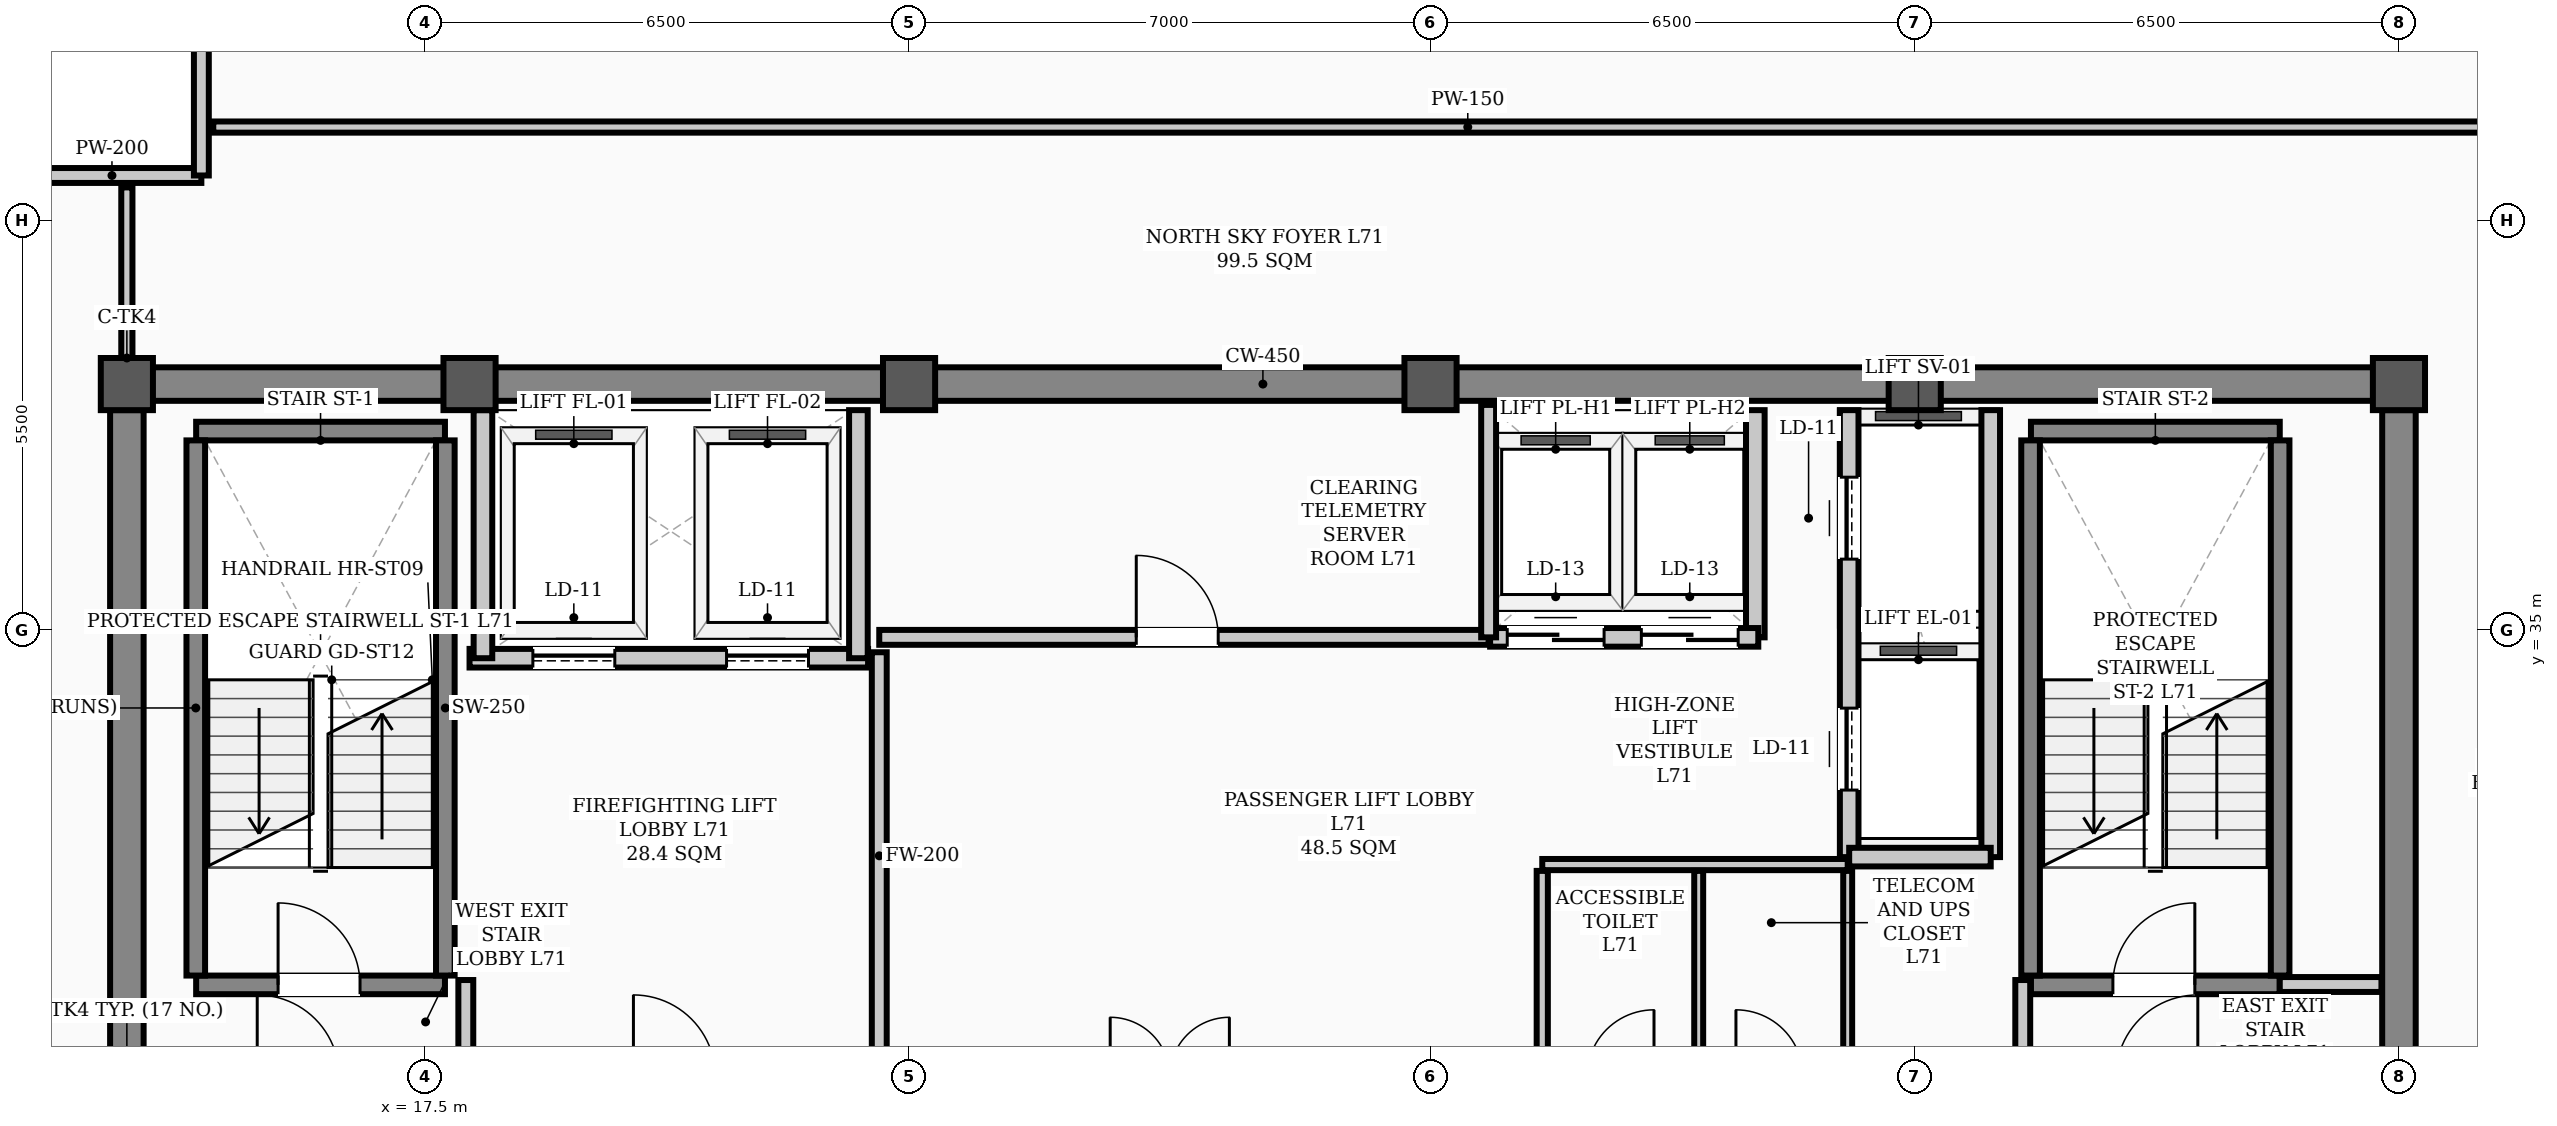
"""IFC4 building model, lengths in metres.
Left out: names, types, materials, properties, quantities, classifications, styles, units other than length and angle.
Written with IfcOpenShell. Run it as: python <this file> out.ifc"""

import sys

from ifc_helpers import new_model, si_unit, direction, frame, frame_2d, origin, origin_2d, place, context, subcontext, project, spatial, rectangle, hollow_rectangle, extrude, element, fill, save


model = new_model("IFC4")
c1 = context("Model", 3, precision=1e-05, world=origin(), true_north=direction((0.0, 1.0)))
c2 = subcontext(c1, "Body", "Model", "MODEL_VIEW")
j1 = project(units=[si_unit("LENGTHUNIT", "METRE"), si_unit("PLANEANGLEUNIT", "RADIAN")], contexts=[c1])
p1 = place(None, origin())
s1 = spatial("IfcSite", under=j1, at=p1, CompositionType="ELEMENT")
p2 = place(p1, origin())
s2 = spatial("IfcBuilding", under=s1, at=p2, CompositionType="ELEMENT")
p3 = place(p2, frame((0.0, 0.0, 285.2)))
s3 = spatial("IfcBuildingStorey", under=s2, at=p3, CompositionType="ELEMENT", Elevation=285.2)
for number, where, z_axis, x_axis in (
    (1, (13.5, 38.3, 0.0), (0.0, 0.0, 1.0), (1.0, 0.0, 0.0)),
    (2, (18.1, 38.3, 0.0), (0.0, 0.0, 1.0), (1.0, 0.0, 0.0)),
    (3, (24.0, 38.3, 0.0), (0.0, 0.0, 1.0), (1.0, 0.0, 0.0)),
    (4, (31.0, 38.3, 0.0), (0.0, 0.0, 1.0), (1.0, 0.0, 0.0)),
    (5, (37.5, 38.3, 0.0), (0.0, 0.0, 1.0), (1.0, 0.0, 0.0)),
    (6, (44.0, 38.3, 0.0), (0.0, 0.0, 1.0), (1.0, 0.0, 0.0)),
):
    element("IfcColumn", number, at=place(p3, frame(where, z_axis=z_axis, x_axis=x_axis)), inside=s3, PredefinedType="COLUMN", context=c2, shape_type="SweptSolid", body=[
        extrude(hollow_rectangle(XDim=0.7, YDim=0.7, WallThickness=0.028, InnerFilletRadius=0.014, OuterFilletRadius=0.042, at=origin_2d()), origin(), (0.0, 0.0, 1.0), 3.9),
    ])
for number, where, z_axis, x_axis in (
    (7, (12.1, 41.1, 0.0), (0.0, 0.0, 1.0), (1.0, 0.0, 0.0)),
    (8, (14.5, 41.1, 0.0), (0.0, 0.0, 1.0), (0.0, 1.0, 0.0)),
):
    element("IfcWall", number, at=place(p3, frame(where, z_axis=z_axis, x_axis=x_axis)), inside=s3, PredefinedType="PARAPET", context=c2, shape_type="SweptSolid", body=[
        extrude(rectangle(XDim=2.4, YDim=0.2, at=frame_2d((1.2, 0.0))), origin(), (0.0, 0.0, 1.0), 1.2),
    ])
p4 = place(p3, frame((13.5, 38.3, 0.0), z_axis=(0.0, 0.0, 1.0), x_axis=(1.0, 0.0, 0.0)))
e9 = element("IfcWall", 9, at=p4, inside=s3, PredefinedType="SHEAR", context=c2, shape_type="SweptSolid", body=[
    extrude(rectangle(XDim=30.5, YDim=0.45, at=frame_2d((15.25, 0.0))), origin(), (0.0, 0.0, 1.0), 3.72),
])
for number, where, z_axis, x_axis in (
    (10, (13.5, 29.35, 0.0), (0.0, 0.0, 1.0), (0.0, 1.0, 0.0)),
    (11, (44.0, 29.35, 0.0), (0.0, 0.0, 1.0), (0.0, 1.0, 0.0)),
):
    element("IfcWall", number, at=place(p3, frame(where, z_axis=z_axis, x_axis=x_axis)), inside=s3, PredefinedType="SHEAR", context=c2, shape_type="SweptSolid", body=[
        extrude(rectangle(XDim=8.6, YDim=0.45, at=frame_2d((4.3, 0.0))), origin(), (0.0, 0.0, 1.0), 3.72),
    ])
p5 = place(p3, frame((14.43, 30.235, 0.0), z_axis=(0.0, 0.0, 1.0), x_axis=(1.0, 0.0, 0.0)))
e12 = element("IfcWall", 12, at=p5, inside=s3, PredefinedType="STANDARD", context=c2, shape_type="SweptSolid", body=[
    extrude(rectangle(XDim=3.34, YDim=0.25, at=frame_2d((1.67, 0.0))), origin(), (0.0, 0.0, 1.0), 3.72),
])
p6 = place(p5, frame((1.1, 0.0, 0.0)))
e13 = element("IfcOpeningElement", 13, at=p6, cuts=e12, PredefinedType="OPENING", context=c2, shape_type="SweptSolid", body=[
    extrude(rectangle(XDim=1.1, YDim=2.08, at=frame_2d((0.55, 1.04))), frame((0.0, 0.135, 0.0), z_axis=(0.0, -1.0, 0.0), x_axis=(1.0, 0.0, 0.0)), (0.0, 0.0, 1.0), 0.27),
])
p7 = place(p3, frame((14.43, 37.669, 0.0), z_axis=(0.0, 0.0, 1.0), x_axis=(1.0, 0.0, 0.0)))
e14 = element("IfcWall", 14, at=p7, inside=s3, PredefinedType="STANDARD", context=c2, shape_type="SweptSolid", body=[
    extrude(rectangle(XDim=3.34, YDim=0.25, at=frame_2d((1.67, 0.0))), origin(), (0.0, 0.0, 1.0), 3.72),
])
for number, where, z_axis, x_axis in (
    (15, (14.425, 30.36, 0.0), (0.0, 0.0, 1.0), (0.0, 1.0, 0.0)),
    (16, (17.775, 30.36, 0.0), (0.0, 0.0, 1.0), (0.0, 1.0, 0.0)),
):
    element("IfcWall", number, at=place(p3, frame(where, z_axis=z_axis, x_axis=x_axis)), inside=s3, PredefinedType="STANDARD", context=c2, shape_type="SweptSolid", body=[
        extrude(rectangle(XDim=7.184, YDim=0.25, at=frame_2d((3.592, 0.0))), origin(), (0.0, 0.0, 1.0), 3.72),
    ])
p8 = place(p3, frame((39.06, 30.235, 0.0), z_axis=(0.0, 0.0, 1.0), x_axis=(1.0, 0.0, 0.0)))
e17 = element("IfcWall", 17, at=p8, inside=s3, PredefinedType="STANDARD", context=c2, shape_type="SweptSolid", body=[
    extrude(rectangle(XDim=3.34, YDim=0.25, at=frame_2d((1.67, 0.0))), origin(), (0.0, 0.0, 1.0), 3.72),
])
p9 = place(p8, frame((1.1, 0.0, 0.0)))
e18 = element("IfcOpeningElement", 18, at=p9, cuts=e17, PredefinedType="OPENING", context=c2, shape_type="SweptSolid", body=[
    extrude(rectangle(XDim=1.1, YDim=2.08, at=frame_2d((0.55, 1.04))), frame((0.0, 0.135, 0.0), z_axis=(0.0, -1.0, 0.0), x_axis=(1.0, 0.0, 0.0)), (0.0, 0.0, 1.0), 0.27),
])
p10 = place(p3, frame((39.06, 37.669, 0.0), z_axis=(0.0, 0.0, 1.0), x_axis=(1.0, 0.0, 0.0)))
e19 = element("IfcWall", 19, at=p10, inside=s3, PredefinedType="STANDARD", context=c2, shape_type="SweptSolid", body=[
    extrude(rectangle(XDim=3.34, YDim=0.25, at=frame_2d((1.67, 0.0))), origin(), (0.0, 0.0, 1.0), 3.72),
])
for number, where, z_axis, x_axis in (
    (20, (39.055, 30.36, 0.0), (0.0, 0.0, 1.0), (0.0, 1.0, 0.0)),
    (21, (42.405, 30.36, 0.0), (0.0, 0.0, 1.0), (0.0, 1.0, 0.0)),
):
    element("IfcWall", number, at=place(p3, frame(where, z_axis=z_axis, x_axis=x_axis)), inside=s3, PredefinedType="STANDARD", context=c2, shape_type="SweptSolid", body=[
        extrude(rectangle(XDim=7.184, YDim=0.25, at=frame_2d((3.592, 0.0))), origin(), (0.0, 0.0, 1.0), 3.72),
    ])
p11 = place(p3, frame((18.1, 34.62, 0.0), z_axis=(0.0, 0.0, 1.0), x_axis=(1.0, 0.0, 0.0)))
e22 = element("IfcWall", 22, at=p11, inside=s3, PredefinedType="STANDARD", context=c2, shape_type="SweptSolid", body=[
    extrude(rectangle(XDim=5.35, YDim=0.25, at=frame_2d((2.675, 0.0))), origin(), (0.0, 0.0, 1.0), 3.72),
])
p12 = place(p11, frame((0.85, 0.0, 0.0)))
e23 = element("IfcOpeningElement", 23, at=p12, cuts=e22, PredefinedType="OPENING", context=c2, shape_type="SweptSolid", body=[
    extrude(rectangle(XDim=1.1, YDim=2.08, at=frame_2d((0.55, 1.04))), frame((0.0, 0.135, 0.0), z_axis=(0.0, -1.0, 0.0), x_axis=(1.0, 0.0, 0.0)), (0.0, 0.0, 1.0), 0.27),
])
p13 = place(p11, frame((3.45, 0.0, 0.0)))
e24 = element("IfcOpeningElement", 24, at=p13, cuts=e22, PredefinedType="OPENING", context=c2, shape_type="SweptSolid", body=[
    extrude(rectangle(XDim=1.1, YDim=2.08, at=frame_2d((0.55, 1.04))), frame((0.0, 0.135, 0.0), z_axis=(0.0, -1.0, 0.0), x_axis=(1.0, 0.0, 0.0)), (0.0, 0.0, 1.0), 0.27),
])
p14 = place(p3, frame((36.62, 31.95, 0.0), z_axis=(0.0, 0.0, 1.0), x_axis=(0.0, 1.0, 0.0)))
e25 = element("IfcWall", 25, at=p14, inside=s3, PredefinedType="STANDARD", context=c2, shape_type="SweptSolid", body=[
    extrude(rectangle(XDim=6.0, YDim=0.25, at=frame_2d((3.0, 0.0))), origin(), (0.0, 0.0, 1.0), 3.4),
])
p15 = place(p14, frame((0.9, 0.0, 0.0)))
e26 = element("IfcOpeningElement", 26, at=p15, cuts=e25, PredefinedType="OPENING", context=c2, shape_type="SweptSolid", body=[
    extrude(rectangle(XDim=1.1, YDim=2.08, at=frame_2d((0.55, 1.04))), frame((0.0, 0.135, 0.0), z_axis=(0.0, -1.0, 0.0), x_axis=(1.0, 0.0, 0.0)), (0.0, 0.0, 1.0), 0.27),
])
p16 = place(p14, frame((4.0, 0.0, 0.0)))
e27 = element("IfcOpeningElement", 27, at=p16, cuts=e25, PredefinedType="OPENING", context=c2, shape_type="SweptSolid", body=[
    extrude(rectangle(XDim=1.1, YDim=2.08, at=frame_2d((0.55, 1.04))), frame((0.0, 0.135, 0.0), z_axis=(0.0, -1.0, 0.0), x_axis=(1.0, 0.0, 0.0)), (0.0, 0.0, 1.0), 0.27),
])
p17 = place(p3, frame((38.52, 31.95, 0.0), z_axis=(0.0, 0.0, 1.0), x_axis=(0.0, 1.0, 0.0)))
e28 = element("IfcWall", 28, at=p17, inside=s3, PredefinedType="STANDARD", context=c2, shape_type="SweptSolid", body=[
    extrude(rectangle(XDim=6.0, YDim=0.25, at=frame_2d((3.0, 0.0))), origin(), (0.0, 0.0, 1.0), 3.4),
])
p18 = place(p3, frame((36.62, 31.95, 0.0), z_axis=(0.0, 0.0, 1.0), x_axis=(1.0, 0.0, 0.0)))
e29 = element("IfcWall", 29, at=p18, inside=s3, PredefinedType="STANDARD", context=c2, shape_type="SweptSolid", body=[
    extrude(rectangle(XDim=1.9, YDim=0.25, at=frame_2d((0.95, 0.0))), origin(), (0.0, 0.0, 1.0), 3.48),
])
for number, where, z_axis, x_axis in (
    (30, (18.28, 34.62, 0.0), (0.0, 0.0, 1.0), (0.0, 1.0, 0.0)),
    (31, (23.32, 34.62, 0.0), (0.0, 0.0, 1.0), (0.0, 1.0, 0.0)),
):
    element("IfcWall", number, at=place(p3, frame(where, z_axis=z_axis, x_axis=x_axis)), inside=s3, PredefinedType="STANDARD", context=c2, shape_type="SweptSolid", body=[
        extrude(rectangle(XDim=3.33, YDim=0.25, at=frame_2d((1.665, 0.0))), origin(), (0.0, 0.0, 1.0), 3.72),
    ])
p19 = place(p3, frame((35.36, 34.9, 0.0), z_axis=(0.0, 0.0, 1.0), x_axis=(0.0, 1.0, 0.0)))
e32 = element("IfcWall", 32, at=p19, inside=s3, PredefinedType="STANDARD", context=c2, shape_type="SweptSolid", body=[
    extrude(rectangle(XDim=3.05, YDim=0.25, at=frame_2d((1.525, 0.0))), origin(), (0.0, 0.0, 1.0), 3.4),
])
p20 = place(p3, frame((31.8, 34.9, 0.0), z_axis=(0.0, 0.0, 1.0), x_axis=(1.0, 0.0, 0.0)))
e33 = element("IfcWall", 33, at=p20, inside=s3, PredefinedType="STANDARD", context=c2, shape_type="SweptSolid", body=[
    extrude(rectangle(XDim=3.6, YDim=0.25, at=frame_2d((1.8, 0.0))), origin(), (0.0, 0.0, 1.0), 3.72),
])
p21 = place(p20, frame((0.23, 0.0, 0.0)))
e34 = element("IfcOpeningElement", 34, at=p21, cuts=e33, PredefinedType="OPENING", context=c2, shape_type="SweptSolid", body=[
    extrude(rectangle(XDim=1.3, YDim=2.08, at=frame_2d((0.65, 1.04))), frame((0.0, 0.135, 0.0), z_axis=(0.0, -1.0, 0.0), x_axis=(1.0, 0.0, 0.0)), (0.0, 0.0, 1.0), 0.27),
])
p22 = place(p20, frame((2.03, 0.0, 0.0)))
e35 = element("IfcOpeningElement", 35, at=p22, cuts=e33, PredefinedType="OPENING", context=c2, shape_type="SweptSolid", body=[
    extrude(rectangle(XDim=1.3, YDim=2.08, at=frame_2d((0.65, 1.04))), frame((0.0, 0.135, 0.0), z_axis=(0.0, -1.0, 0.0), x_axis=(1.0, 0.0, 0.0)), (0.0, 0.0, 1.0), 0.27),
])
p23 = place(p3, frame((42.4, 30.24, 0.0), z_axis=(0.0, 0.0, 1.0), x_axis=(1.0, 0.0, 0.0)))
e36 = element("IfcWall", 36, at=p23, inside=s3, PredefinedType="STANDARD", context=c2, shape_type="SweptSolid", body=[
    extrude(rectangle(XDim=1.365, YDim=0.2, at=frame_2d((0.683, 0.0))), origin(), (0.0, 0.0, 1.0), 3.2),
])
p24 = place(p3, frame((23.6, 34.9, 0.0), z_axis=(0.0, 0.0, 1.0), x_axis=(1.0, 0.0, 0.0)))
e37 = element("IfcWall", 37, at=p24, inside=s3, PredefinedType="STANDARD", context=c2, shape_type="SweptSolid", body=[
    extrude(rectangle(XDim=8.18, YDim=0.2, at=frame_2d((4.09, 0.0))), origin(), (0.0, 0.0, 1.0), 3.72),
])
p25 = place(p24, frame((3.45, 0.0, 0.0)))
e38 = element("IfcOpeningElement", 38, at=p25, cuts=e37, PredefinedType="OPENING", context=c2, shape_type="SweptSolid", body=[
    extrude(rectangle(XDim=1.1, YDim=2.08, at=frame_2d((0.55, 1.04))), frame((0.0, 0.11, 0.0), z_axis=(0.0, -1.0, 0.0), x_axis=(1.0, 0.0, 0.0)), (0.0, 0.0, 1.0), 0.22),
])
p26 = place(p3, frame((32.5, 31.85, 0.0), z_axis=(0.0, 0.0, 1.0), x_axis=(1.0, 0.0, 0.0)))
e39 = element("IfcWall", 39, at=p26, inside=s3, PredefinedType="PARTITIONING", context=c2, shape_type="SweptSolid", body=[
    extrude(rectangle(XDim=4.1, YDim=0.15, at=frame_2d((2.05, 0.0))), origin(), (0.0, 0.0, 1.0), 3.72),
])
p27 = place(p3, frame((14.66, 41.75, 0.0), z_axis=(0.0, 0.0, 1.0), x_axis=(1.0, 0.0, 0.0)))
e40 = element("IfcWall", 40, at=p27, inside=s3, PredefinedType="PARTITIONING", context=c2, shape_type="SweptSolid", body=[
    extrude(rectangle(XDim=33.68, YDim=0.15, at=frame_2d((16.84, 0.0))), origin(), (0.0, 0.0, 1.0), 3.2),
])
p28 = place(p3, frame((18.05, 29.235, 0.0), z_axis=(0.0, 0.0, 1.0), x_axis=(0.0, 1.0, 0.0)))
e41 = element("IfcWall", 41, at=p28, inside=s3, PredefinedType="STANDARD", context=c2, shape_type="SweptSolid", body=[
    extrude(rectangle(XDim=1.065, YDim=0.2, at=frame_2d((0.532, 0.0))), origin(), (0.0, 0.0, 1.0), 3.72),
])
p29 = place(p3, frame((38.95, 29.235, 0.0), z_axis=(0.0, 0.0, 1.0), x_axis=(0.0, 1.0, 0.0)))
e42 = element("IfcWall", 42, at=p29, inside=s3, PredefinedType="STANDARD", context=c2, shape_type="SweptSolid", body=[
    extrude(rectangle(XDim=1.065, YDim=0.2, at=frame_2d((0.532, 0.0))), origin(), (0.0, 0.0, 1.0), 3.4),
])
p30 = place(p3, frame((23.6, 29.235, 0.0), z_axis=(0.0, 0.0, 1.0), x_axis=(0.0, 1.0, 0.0)))
e43 = element("IfcWall", 43, at=p30, inside=s3, PredefinedType="STANDARD", context=c2, shape_type="SweptSolid", body=[
    extrude(rectangle(XDim=5.465, YDim=0.2, at=frame_2d((2.732, 0.0))), origin(), (0.0, 0.0, 1.0), 3.2),
])
p31 = place(p3, frame((32.5, 29.235, 0.0), z_axis=(0.0, 0.0, 1.0), x_axis=(0.0, 1.0, 0.0)))
e44 = element("IfcWall", 44, at=p31, inside=s3, PredefinedType="PARTITIONING", context=c2, shape_type="SweptSolid", body=[
    extrude(rectangle(XDim=2.53, YDim=0.15, at=frame_2d((1.265, 0.0))), origin(), (0.0, 0.0, 1.0), 3.4),
])
for number, where, z_axis, x_axis in (
    (45, (36.6, 29.235, 0.0), (0.0, 0.0, 1.0), (0.0, 1.0, 0.0)),
    (46, (34.6, 29.235, 0.0), (0.0, 0.0, 1.0), (0.0, 1.0, 0.0)),
):
    element("IfcWall", number, at=place(p3, frame(where, z_axis=z_axis, x_axis=x_axis)), inside=s3, PredefinedType="PARTITIONING", context=c2, shape_type="SweptSolid", body=[
        extrude(rectangle(XDim=2.53, YDim=0.12, at=frame_2d((1.265, 0.0))), origin(), (0.0, 0.0, 1.0), 3.4),
    ])
p32 = place(p3, frame((13.5, 38.535, 0.0), z_axis=(0.0, 0.0, 1.0), x_axis=(0.0, 1.0, 0.0)))
e47 = element("IfcWall", 47, at=p32, inside=s3, PredefinedType="PARTITIONING", context=c2, shape_type="SweptSolid", body=[
    extrude(rectangle(XDim=2.405, YDim=0.15, at=frame_2d((1.203, 0.0))), origin(), (0.0, 0.0, 1.0), 3.72),
])
p33 = place(p3, frame((31.78, 34.9, 0.0), z_axis=(0.0, 0.0, 1.0), x_axis=(0.0, 1.0, 0.0)))
e48 = element("IfcWall", 48, at=p33, inside=s3, PredefinedType="STANDARD", context=c2, shape_type="SweptSolid", body=[
    extrude(rectangle(XDim=3.12, YDim=0.2, at=frame_2d((1.56, 0.0))), origin(), (0.0, 0.0, 1.0), 3.4),
])
p34 = place(p6, origin())
e49 = element("IfcDoor", 49, at=p34, inside=s3, OperationType="SINGLE_SWING_LEFT", PredefinedType="DOOR", context=c2, shape_type="SweptSolid", body=[
    extrude(rectangle(XDim=1.1, YDim=2.08, at=frame_2d((0.55, 1.04))), frame((0.0, 0.025, 0.0), z_axis=(0.0, -1.0, 0.0), x_axis=(1.0, 0.0, 0.0)), (0.0, 0.0, 1.0), 0.05),
])
fill(e13, e49)
p35 = place(p9, origin())
e50 = element("IfcDoor", 50, at=p35, inside=s3, OperationType="SINGLE_SWING_RIGHT", PredefinedType="DOOR", context=c2, shape_type="SweptSolid", body=[
    extrude(rectangle(XDim=1.1, YDim=2.08, at=frame_2d((0.55, 1.04))), frame((0.0, 0.025, 0.0), z_axis=(0.0, -1.0, 0.0), x_axis=(1.0, 0.0, 0.0)), (0.0, 0.0, 1.0), 0.05),
])
fill(e18, e50)
p36 = place(p25, origin())
e51 = element("IfcDoor", 51, at=p36, inside=s3, OperationType="SINGLE_SWING_LEFT", PredefinedType="DOOR", context=c2, shape_type="SweptSolid", body=[
    extrude(rectangle(XDim=1.1, YDim=2.08, at=frame_2d((0.55, 1.04))), frame((0.0, 0.025, 0.0), z_axis=(0.0, -1.0, 0.0), x_axis=(1.0, 0.0, 0.0)), (0.0, 0.0, 1.0), 0.05),
])
fill(e38, e51)
p37 = place(p12, origin())
e52 = element("IfcDoor", 52, at=p37, inside=s3, OperationType="SLIDING_TO_LEFT", PredefinedType="DOOR", context=c2, shape_type="SweptSolid", body=[
    extrude(rectangle(XDim=1.1, YDim=2.08, at=frame_2d((0.55, 1.04))), frame((0.0, 0.025, 0.0), z_axis=(0.0, -1.0, 0.0), x_axis=(1.0, 0.0, 0.0)), (0.0, 0.0, 1.0), 0.05),
])
fill(e23, e52)
p38 = place(p13, origin())
e53 = element("IfcDoor", 53, at=p38, inside=s3, OperationType="SLIDING_TO_LEFT", PredefinedType="DOOR", context=c2, shape_type="SweptSolid", body=[
    extrude(rectangle(XDim=1.1, YDim=2.08, at=frame_2d((0.55, 1.04))), frame((0.0, 0.025, 0.0), z_axis=(0.0, -1.0, 0.0), x_axis=(1.0, 0.0, 0.0)), (0.0, 0.0, 1.0), 0.05),
])
fill(e24, e53)
p39 = place(p15, origin())
e54 = element("IfcDoor", 54, at=p39, inside=s3, OperationType="SLIDING_TO_LEFT", PredefinedType="DOOR", context=c2, shape_type="SweptSolid", body=[
    extrude(rectangle(XDim=1.1, YDim=2.08, at=frame_2d((0.55, 1.04))), frame((0.0, 0.025, 0.0), z_axis=(0.0, -1.0, 0.0), x_axis=(1.0, 0.0, 0.0)), (0.0, 0.0, 1.0), 0.05),
])
fill(e26, e54)
p40 = place(p16, origin())
e55 = element("IfcDoor", 55, at=p40, inside=s3, OperationType="SLIDING_TO_LEFT", PredefinedType="DOOR", context=c2, shape_type="SweptSolid", body=[
    extrude(rectangle(XDim=1.1, YDim=2.08, at=frame_2d((0.55, 1.04))), frame((0.0, 0.025, 0.0), z_axis=(0.0, -1.0, 0.0), x_axis=(1.0, 0.0, 0.0)), (0.0, 0.0, 1.0), 0.05),
])
fill(e27, e55)
p41 = place(p21, origin())
e56 = element("IfcDoor", 56, at=p41, inside=s3, OperationType="DOUBLE_DOOR_SLIDING", PredefinedType="DOOR", context=c2, shape_type="SweptSolid", body=[
    extrude(rectangle(XDim=1.3, YDim=2.08, at=frame_2d((0.65, 1.04))), frame((0.0, 0.025, 0.0), z_axis=(0.0, -1.0, 0.0), x_axis=(1.0, 0.0, 0.0)), (0.0, 0.0, 1.0), 0.05),
])
fill(e34, e56)
p42 = place(p22, origin())
e57 = element("IfcDoor", 57, at=p42, inside=s3, OperationType="DOUBLE_DOOR_SLIDING", PredefinedType="DOOR", context=c2, shape_type="SweptSolid", body=[
    extrude(rectangle(XDim=1.3, YDim=2.08, at=frame_2d((0.65, 1.04))), frame((0.0, 0.025, 0.0), z_axis=(0.0, -1.0, 0.0), x_axis=(1.0, 0.0, 0.0)), (0.0, 0.0, 1.0), 0.05),
])
fill(e35, e57)
save(model, sys.argv[1])
